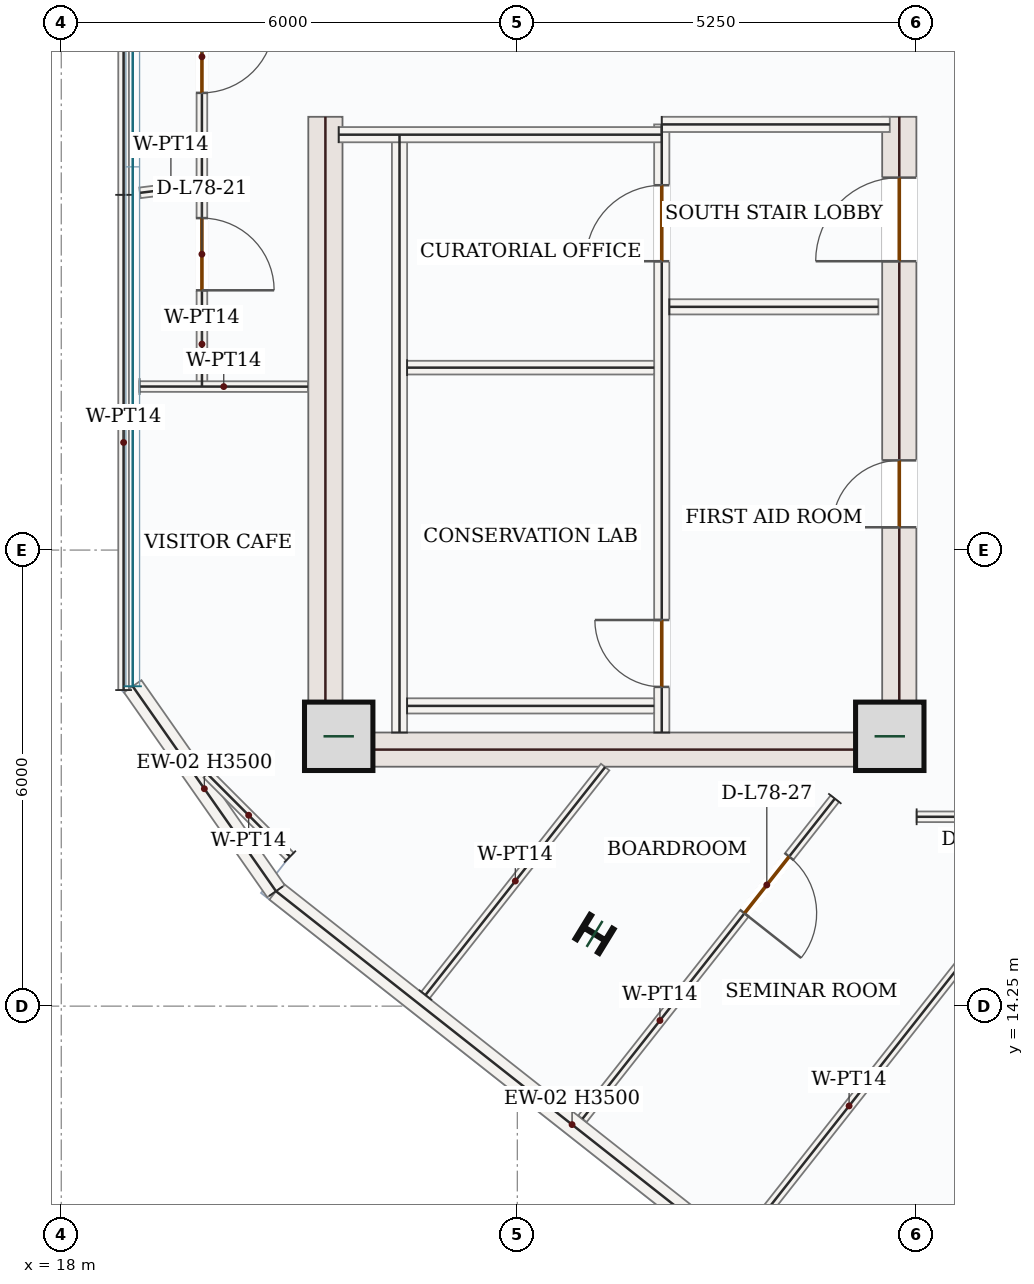
"""IFC4 building model, lengths in metres.
Left out: names, types, materials, properties, quantities, classifications, styles, units other than length and angle.
Written with IfcOpenShell. Run it as: python <this file> out.ifc"""

import sys

from ifc_helpers import new_model, si_unit, direction, frame, frame_2d, origin, origin_2d, place, context, subcontext, project, spatial, rectangle, i_section, extrude, source, transform, mapped, element, fill, save


model = new_model("IFC4")
c1 = context("Model", 3, precision=1e-05, world=origin(), true_north=direction((0.0, 1.0)))
c2 = subcontext(c1, "Body", "Model", "MODEL_VIEW")
j1 = project(units=[si_unit("LENGTHUNIT", "METRE"), si_unit("PLANEANGLEUNIT", "RADIAN")], contexts=[c1])
p1 = place(None, origin())
s1 = spatial("IfcSite", under=j1, at=p1, CompositionType="ELEMENT")
p2 = place(p1, origin())
s2 = spatial("IfcBuilding", under=s1, at=p2, CompositionType="ELEMENT")
p3 = place(p2, frame((0.0, 0.0, 323.55)))
s3 = spatial("IfcBuildingStorey", under=s2, at=p3, CompositionType="ELEMENT", Elevation=323.55)
m1 = source(origin(), c2, "Body", "SweptSolid", [
    extrude(rectangle(XDim=8.55, YDim=0.45, at=frame_2d((4.275, 0.0))), origin(), (0.0, 0.0, 1.0), 3.5),
])
p4 = place(p3, frame((21.475, 17.4, 0.0), z_axis=(0.0, 0.0, 1.0), x_axis=(0.0, 1.0, 0.0)))
e1 = element("IfcWall", 1, at=p4, inside=s3, PredefinedType="SHEAR", context=c2, shape_type="MappedRepresentation", body=[
    mapped(m1, transform((0.0, 0.0, 0.0), x_axis=(1.0, 0.0, 0.0), y_axis=(0.0, 1.0, 0.0), z_axis=(0.0, 0.0, 1.0), scale=1.0)),
])
p5 = place(p3, frame((29.025, 17.4, 0.0), z_axis=(0.0, 0.0, 1.0), x_axis=(0.0, 1.0, 0.0)))
e2 = element("IfcWall", 2, at=p5, inside=s3, PredefinedType="SHEAR", context=c2, shape_type="SweptSolid", body=[
    extrude(rectangle(XDim=8.55, YDim=0.45, at=frame_2d((4.275, 0.0))), origin(), (0.0, 0.0, 1.0), 3.5),
])
p6 = place(p5, frame((6.65, 0.0, 0.0)))
e3 = element("IfcOpeningElement", 3, at=p6, cuts=e2, PredefinedType="OPENING", context=c2, shape_type="SweptSolid", body=[
    extrude(rectangle(XDim=1.1, YDim=2.2, at=frame_2d((0.55, 1.1))), frame((0.0, 0.235, 0.0), z_axis=(0.0, -1.0, 0.0), x_axis=(1.0, 0.0, 0.0)), (0.0, 0.0, 1.0), 0.47),
])
p7 = place(p5, frame((3.15, 0.0, 0.0)))
e4 = element("IfcOpeningElement", 4, at=p7, cuts=e2, PredefinedType="OPENING", context=c2, shape_type="SweptSolid", body=[
    extrude(rectangle(XDim=0.88, YDim=2.1, at=frame_2d((0.44, 1.05))), frame((0.0, 0.235, 0.0), z_axis=(0.0, -1.0, 0.0), x_axis=(1.0, 0.0, 0.0)), (0.0, 0.0, 1.0), 0.47),
])
m2 = source(origin(), c2, "Body", "SweptSolid", [
    extrude(rectangle(XDim=7.1, YDim=0.45, at=frame_2d((3.55, 0.0))), origin(), (0.0, 0.0, 1.0), 3.5),
])
p8 = place(p3, frame((21.7, 17.625, 0.0), z_axis=(0.0, 0.0, 1.0), x_axis=(1.0, 0.0, 0.0)))
e5 = element("IfcWall", 5, at=p8, inside=s3, PredefinedType="SHEAR", context=c2, shape_type="MappedRepresentation", body=[
    mapped(m2, transform((0.0, 0.0, 0.0), x_axis=(1.0, 0.0, 0.0), y_axis=(0.0, 1.0, 0.0), z_axis=(0.0, 0.0, 1.0), scale=1.0)),
])
m3 = source(origin(), c2, "Body", "SweptSolid", [
    extrude(rectangle(XDim=0.9, YDim=0.9, at=origin_2d()), origin(), (0.0, 0.0, 1.0), 3.75),
])
for number, where, z_axis, x_axis in (
    (6, (21.65, 17.8, 0.0), (0.0, 0.0, 1.0), (1.0, 0.0, 0.0)),
    (7, (28.9, 17.8, 0.0), (0.0, 0.0, 1.0), (1.0, 0.0, 0.0)),
):
    element("IfcColumn", number, at=place(p3, frame(where, z_axis=z_axis, x_axis=x_axis)), inside=s3, PredefinedType="COLUMN", context=c2, shape_type="MappedRepresentation", body=[
        mapped(m3, transform((0.0, 0.0, 0.0), x_axis=(1.0, 0.0, 0.0), y_axis=(0.0, 1.0, 0.0), z_axis=(0.0, 0.0, 1.0), scale=1.0)),
    ])
m4 = source(origin(), c2, "Body", "SweptSolid", [
    extrude(i_section(OverallWidth=0.374, OverallDepth=0.372, WebThickness=0.016, FlangeThickness=0.026, FilletRadius=0.018, at=origin_2d()), origin(), (0.0, 0.0, 1.0), 3.75),
])
p9 = place(p3, frame((25.016, 15.2, 0.0), z_axis=(0.0, 0.0, 1.0), x_axis=(0.522498564716, 0.852640164354, 0.0)))
e8 = element("IfcColumn", 8, at=p9, inside=s3, PredefinedType="COLUMN", context=c2, shape_type="MappedRepresentation", body=[
    mapped(m4, transform((0.0, 0.0, 0.0), x_axis=(1.0, 0.0, 0.0), y_axis=(0.0, 1.0, 0.0), z_axis=(0.0, 0.0, 1.0), scale=1.0)),
])
m5 = source(origin(), c2, "Body", "SweptSolid", [
    extrude(rectangle(XDim=9.92, YDim=0.28, at=frame_2d((4.96, 0.0))), origin(), (0.0, 0.0, 1.0), 3.5),
])
p10 = place(p3, frame((28.615, 9.621, 0.0), z_axis=(0.0, 0.0, 1.0), x_axis=(-0.785317257435, 0.619093535077, 0.0)))
e9 = element("IfcWall", 9, at=p10, inside=s3, PredefinedType="SOLIDWALL", context=c2, shape_type="MappedRepresentation", body=[
    mapped(m5, transform((0.0, 0.0, 0.0), x_axis=(1.0, 0.0, 0.0), y_axis=(0.0, 1.0, 0.0), z_axis=(0.0, 0.0, 1.0), scale=1.0)),
])
m6 = source(origin(), c2, "Body", "SweptSolid", [
    extrude(rectangle(XDim=3.29, YDim=0.28, at=frame_2d((1.645, 0.0))), origin(), (0.0, 0.0, 1.0), 3.5),
])
p11 = place(p3, frame((20.825, 15.762, 0.0), z_axis=(0.0, 0.0, 1.0), x_axis=(-0.573043854491, 0.819524704222, 0.0)))
e10 = element("IfcWall", 10, at=p11, inside=s3, PredefinedType="SOLIDWALL", context=c2, shape_type="MappedRepresentation", body=[
    mapped(m6, transform((0.0, 0.0, 0.0), x_axis=(1.0, 0.0, 0.0), y_axis=(0.0, 1.0, 0.0), z_axis=(0.0, 0.0, 1.0), scale=1.0)),
])
m7 = source(origin(), c2, "Body", "SweptSolid", [
    extrude(rectangle(XDim=7.87, YDim=0.2, at=frame_2d((3.935, 0.0))), origin(), (0.0, 0.0, 1.0), 3.5),
])
p12 = place(p3, frame((22.45, 17.85, 0.0), z_axis=(0.0, 0.0, 1.0), x_axis=(0.0, 1.0, 0.0)))
e11 = element("IfcWall", 11, at=p12, inside=s3, PredefinedType="SOLIDWALL", context=c2, shape_type="MappedRepresentation", body=[
    mapped(m7, transform((0.0, 0.0, 0.0), x_axis=(1.0, 0.0, 0.0), y_axis=(0.0, 1.0, 0.0), z_axis=(0.0, 0.0, 1.0), scale=1.0)),
])
p13 = place(p3, frame((25.9, 17.85, 0.0), z_axis=(0.0, 0.0, 1.0), x_axis=(0.0, 1.0, 0.0)))
e12 = element("IfcWall", 12, at=p13, inside=s3, PredefinedType="SOLIDWALL", context=c2, shape_type="SweptSolid", body=[
    extrude(rectangle(XDim=8.0, YDim=0.2, at=frame_2d((4.0, 0.0))), origin(), (0.0, 0.0, 1.0), 3.5),
])
p14 = place(p13, frame((6.2, 0.0, 0.0)))
e13 = element("IfcOpeningElement", 13, at=p14, cuts=e12, PredefinedType="OPENING", context=c2, shape_type="SweptSolid", body=[
    extrude(rectangle(XDim=1.0, YDim=2.15, at=frame_2d((0.5, 1.075))), frame((0.0, 0.11, 0.0), z_axis=(0.0, -1.0, 0.0), x_axis=(1.0, 0.0, 0.0)), (0.0, 0.0, 1.0), 0.22),
])
p15 = place(p13, frame((0.6, 0.0, 0.0)))
e14 = element("IfcOpeningElement", 14, at=p15, cuts=e12, PredefinedType="OPENING", context=c2, shape_type="SweptSolid", body=[
    extrude(rectangle(XDim=0.88, YDim=2.1, at=frame_2d((0.44, 1.05))), frame((0.0, 0.11, 0.0), z_axis=(0.0, -1.0, 0.0), x_axis=(1.0, 0.0, 0.0)), (0.0, 0.0, 1.0), 0.22),
])
m8 = source(origin(), c2, "Body", "SweptSolid", [
    extrude(rectangle(XDim=4.25, YDim=0.2, at=frame_2d((2.125, 0.0))), origin(), (0.0, 0.0, 1.0), 3.5),
])
p16 = place(p3, frame((21.65, 25.715, 0.0), z_axis=(0.0, 0.0, 1.0), x_axis=(1.0, 0.0, 0.0)))
e15 = element("IfcWall", 15, at=p16, inside=s3, PredefinedType="SOLIDWALL", context=c2, shape_type="MappedRepresentation", body=[
    mapped(m8, transform((0.0, 0.0, 0.0), x_axis=(1.0, 0.0, 0.0), y_axis=(0.0, 1.0, 0.0), z_axis=(0.0, 0.0, 1.0), scale=1.0)),
])
m9 = source(origin(), c2, "Body", "SweptSolid", [
    extrude(rectangle(XDim=3.0, YDim=0.2, at=frame_2d((1.5, 0.0))), origin(), (0.0, 0.0, 1.0), 3.5),
])
p17 = place(p3, frame((25.9, 25.85, 0.0), z_axis=(0.0, 0.0, 1.0), x_axis=(1.0, 0.0, 0.0)))
e16 = element("IfcWall", 16, at=p17, inside=s3, PredefinedType="SOLIDWALL", context=c2, shape_type="MappedRepresentation", body=[
    mapped(m9, transform((0.0, 0.0, 0.0), x_axis=(1.0, 0.0, 0.0), y_axis=(0.0, 1.0, 0.0), z_axis=(0.0, 0.0, 1.0), scale=1.0)),
])
m10 = source(origin(), c2, "Body", "SweptSolid", [
    extrude(rectangle(XDim=3.25, YDim=0.2, at=frame_2d((1.625, 0.0))), origin(), (0.0, 0.0, 1.0), 3.5),
])
p18 = place(p3, frame((22.55, 18.2, 0.0), z_axis=(0.0, 0.0, 1.0), x_axis=(1.0, 0.0, 0.0)))
e17 = element("IfcWall", 17, at=p18, inside=s3, PredefinedType="SOLIDWALL", context=c2, shape_type="MappedRepresentation", body=[
    mapped(m10, transform((0.0, 0.0, 0.0), x_axis=(1.0, 0.0, 0.0), y_axis=(0.0, 1.0, 0.0), z_axis=(0.0, 0.0, 1.0), scale=1.0)),
])
m11 = source(origin(), c2, "Body", "SweptSolid", [
    extrude(rectangle(XDim=3.25, YDim=0.18, at=frame_2d((1.625, 0.0))), origin(), (0.0, 0.0, 1.0), 3.5),
])
p19 = place(p3, frame((22.55, 22.65, 0.0), z_axis=(0.0, 0.0, 1.0), x_axis=(1.0, 0.0, 0.0)))
e18 = element("IfcWall", 18, at=p19, inside=s3, PredefinedType="PARTITIONING", context=c2, shape_type="MappedRepresentation", body=[
    mapped(m11, transform((0.0, 0.0, 0.0), x_axis=(1.0, 0.0, 0.0), y_axis=(0.0, 1.0, 0.0), z_axis=(0.0, 0.0, 1.0), scale=1.0)),
])
m12 = source(origin(), c2, "Body", "SweptSolid", [
    extrude(rectangle(XDim=2.75, YDim=0.2, at=frame_2d((1.375, 0.0))), origin(), (0.0, 0.0, 1.0), 3.5),
])
p20 = place(p3, frame((26.0, 23.45, 0.0), z_axis=(0.0, 0.0, 1.0), x_axis=(1.0, 0.0, 0.0)))
e19 = element("IfcWall", 19, at=p20, inside=s3, PredefinedType="SOLIDWALL", context=c2, shape_type="MappedRepresentation", body=[
    mapped(m12, transform((0.0, 0.0, 0.0), x_axis=(1.0, 0.0, 0.0), y_axis=(0.0, 1.0, 0.0), z_axis=(0.0, 0.0, 1.0), scale=1.0)),
])
m13 = source(origin(), c2, "Body", "SweptSolid", [
    extrude(rectangle(XDim=3.818, YDim=0.14, at=frame_2d((1.909, 0.0))), origin(), (0.0, 0.0, 1.0), 3.5),
])
p21 = place(p3, frame((22.792, 14.396, 0.0), z_axis=(0.0, 0.0, 1.0), x_axis=(0.619119655452, 0.78529666511, 0.0)))
e20 = element("IfcWall", 20, at=p21, inside=s3, PredefinedType="PARTITIONING", context=c2, shape_type="MappedRepresentation", body=[
    mapped(m13, transform((0.0, 0.0, 0.0), x_axis=(1.0, 0.0, 0.0), y_axis=(0.0, 1.0, 0.0), z_axis=(0.0, 0.0, 1.0), scale=1.0)),
])
p22 = place(p3, frame((28.177, 16.98, 0.0), z_axis=(0.0, 0.0, 1.0), x_axis=(-0.619105408422, -0.785307897109, 0.0)))
e21 = element("IfcWall", 21, at=p22, inside=s3, PredefinedType="PARTITIONING", context=c2, shape_type="SweptSolid", body=[
    extrude(rectangle(XDim=5.363, YDim=0.14, at=frame_2d((2.682, 0.0))), origin(), (0.0, 0.0, 1.0), 3.5),
])
p23 = place(p22, frame((0.971, 0.0, 0.0)))
e22 = element("IfcOpeningElement", 22, at=p23, cuts=e21, PredefinedType="OPENING", context=c2, shape_type="SweptSolid", body=[
    extrude(rectangle(XDim=0.95, YDim=2.15, at=frame_2d((0.475, 1.075))), frame((0.0, 0.08, 0.0), z_axis=(0.0, -1.0, 0.0), x_axis=(1.0, 0.0, 0.0)), (0.0, 0.0, 1.0), 0.16),
])
m14 = source(origin(), c2, "Body", "SweptSolid", [
    extrude(rectangle(XDim=2.109, YDim=0.14, at=frame_2d((1.054, 0.0))), origin(), (0.0, 0.0, 1.0), 3.5),
])
p24 = place(p3, frame((29.253, 16.741, 0.0), z_axis=(0.0, 0.0, 1.0), x_axis=(0.999999832474, -0.000578837597, 0.0)))
e23 = element("IfcWall", 23, at=p24, inside=s3, PredefinedType="PARTITIONING", context=c2, shape_type="MappedRepresentation", body=[
    mapped(m14, transform((0.0, 0.0, 0.0), x_axis=(1.0, 0.0, 0.0), y_axis=(0.0, 1.0, 0.0), z_axis=(0.0, 0.0, 1.0), scale=1.0)),
])
p25 = place(p3, frame((31.303, 16.665, 0.0), z_axis=(0.0, 0.0, 1.0), x_axis=(-0.619105259882, -0.785308014213, 0.0)))
e24 = element("IfcWall", 24, at=p25, inside=s3, PredefinedType="PARTITIONING", context=c2, shape_type="SweptSolid", body=[
    extrude(rectangle(XDim=7.051, YDim=0.14, at=frame_2d((3.525, 0.0))), origin(), (0.0, 0.0, 1.0), 3.5),
])
p26 = place(p25, frame((1.342, 0.0, 0.0)))
e25 = element("IfcOpeningElement", 25, at=p26, cuts=e24, PredefinedType="OPENING", context=c2, shape_type="SweptSolid", body=[
    extrude(rectangle(XDim=0.95, YDim=2.15, at=frame_2d((0.475, 1.075))), frame((0.0, 0.08, 0.0), z_axis=(0.0, -1.0, 0.0), x_axis=(1.0, 0.0, 0.0)), (0.0, 0.0, 1.0), 0.16),
])
p27 = place(p3, frame((19.853, 31.523, 0.0), z_axis=(0.0, 0.0, 1.0), x_axis=(-0.000377187662, -0.999999928865, 0.0)))
e26 = element("IfcWall", 26, at=p27, inside=s3, PredefinedType="PARTITIONING", context=c2, shape_type="SweptSolid", body=[
    extrude(rectangle(XDim=6.473, YDim=0.14, at=frame_2d((3.236, 0.0))), origin(), (0.0, 0.0, 1.0), 3.5),
])
p28 = place(p27, frame((4.308, 0.0, 0.0)))
e27 = element("IfcOpeningElement", 27, at=p28, cuts=e26, PredefinedType="OPENING", context=c2, shape_type="SweptSolid", body=[
    extrude(rectangle(XDim=0.95, YDim=2.15, at=frame_2d((0.475, 1.075))), frame((0.0, 0.08, 0.0), z_axis=(0.0, -1.0, 0.0), x_axis=(1.0, 0.0, 0.0)), (0.0, 0.0, 1.0), 0.16),
])
m15 = source(origin(), c2, "Body", "SweptSolid", [
    extrude(rectangle(XDim=0.821, YDim=0.14, at=frame_2d((0.41, 0.0))), origin(), (0.0, 0.0, 1.0), 3.5),
])
p29 = place(p3, frame((19.85, 25.05, 0.0), z_axis=(0.0, 0.0, 1.0), x_axis=(-0.992500466698, -0.122240842617, 0.0)))
e28 = element("IfcWall", 28, at=p29, inside=s3, PredefinedType="PARTITIONING", context=c2, shape_type="MappedRepresentation", body=[
    mapped(m15, transform((0.0, 0.0, 0.0), x_axis=(1.0, 0.0, 0.0), y_axis=(0.0, 1.0, 0.0), z_axis=(0.0, 0.0, 1.0), scale=1.0)),
])
m16 = source(origin(), c2, "Body", "SweptSolid", [
    extrude(rectangle(XDim=6.968, YDim=0.14, at=frame_2d((3.484, 0.0))), origin(), (0.0, 0.0, 1.0), 3.5),
])
p30 = place(p3, frame((18.82, 24.923, 0.0), z_axis=(0.0, 0.0, 1.0), x_axis=(0.0, 1.0, 0.0)))
e29 = element("IfcWall", 29, at=p30, inside=s3, PredefinedType="PARTITIONING", context=c2, shape_type="MappedRepresentation", body=[
    mapped(m16, transform((0.0, 0.0, 0.0), x_axis=(1.0, 0.0, 0.0), y_axis=(0.0, 1.0, 0.0), z_axis=(0.0, 0.0, 1.0), scale=1.0)),
])
p31 = place(p3, frame((19.85, 24.975, 0.0), z_axis=(0.0, 0.0, 1.0), x_axis=(0.000379434615, -0.999999928015, 0.0)))
e30 = element("IfcWall", 30, at=p31, inside=s3, PredefinedType="PARTITIONING", context=c2, shape_type="SweptSolid", body=[
    extrude(rectangle(XDim=2.574, YDim=0.14, at=frame_2d((1.287, 0.0))), origin(), (0.0, 0.0, 1.0), 3.5),
])
p32 = place(p31, frame((0.357, 0.0, 0.0)))
e31 = element("IfcOpeningElement", 31, at=p32, cuts=e30, PredefinedType="OPENING", context=c2, shape_type="SweptSolid", body=[
    extrude(rectangle(XDim=0.95, YDim=2.15, at=frame_2d((0.475, 1.075))), frame((0.0, 0.08, 0.0), z_axis=(0.0, -1.0, 0.0), x_axis=(1.0, 0.0, 0.0)), (0.0, 0.0, 1.0), 0.16),
])
m17 = source(origin(), c2, "Body", "SweptSolid", [
    extrude(rectangle(XDim=2.215, YDim=0.14, at=frame_2d((1.107, 0.0))), origin(), (0.0, 0.0, 1.0), 3.5),
])
p33 = place(p3, frame((19.03, 22.402, 0.0), z_axis=(0.0, 0.0, 1.0), x_axis=(0.999999702379, -0.000771519665, 0.0)))
e32 = element("IfcWall", 32, at=p33, inside=s3, PredefinedType="PARTITIONING", context=c2, shape_type="MappedRepresentation", body=[
    mapped(m17, transform((0.0, 0.0, 0.0), x_axis=(1.0, 0.0, 0.0), y_axis=(0.0, 1.0, 0.0), z_axis=(0.0, 0.0, 1.0), scale=1.0)),
])
m18 = source(origin(), c2, "Body", "SweptSolid", [
    extrude(rectangle(XDim=1.538, YDim=0.14, at=frame_2d((0.769, 0.0))), origin(), (0.0, 0.0, 1.0), 3.5),
])
p34 = place(p3, frame((21.009, 16.217, 0.0), z_axis=(0.0, 0.0, 1.0), x_axis=(-0.706709909315, 0.707503430434, 0.0)))
e33 = element("IfcWall", 33, at=p34, inside=s3, PredefinedType="PARTITIONING", context=c2, shape_type="MappedRepresentation", body=[
    mapped(m18, transform((0.0, 0.0, 0.0), x_axis=(1.0, 0.0, 0.0), y_axis=(0.0, 1.0, 0.0), z_axis=(0.0, 0.0, 1.0), scale=1.0)),
])
m19 = source(origin(), c2, "Body", "SweptSolid", [
    extrude(rectangle(XDim=6.515, YDim=0.14, at=frame_2d((3.258, 0.0))), origin(), (0.0, 0.0, 1.0), 3.5),
])
p35 = place(p3, frame((18.82, 18.408, 0.0), z_axis=(0.0, 0.0, 1.0), x_axis=(0.0, 1.0, 0.0)))
e34 = element("IfcWall", 34, at=p35, inside=s3, PredefinedType="PARTITIONING", context=c2, shape_type="MappedRepresentation", body=[
    mapped(m19, transform((0.0, 0.0, 0.0), x_axis=(1.0, 0.0, 0.0), y_axis=(0.0, 1.0, 0.0), z_axis=(0.0, 0.0, 1.0), scale=1.0)),
])
m20 = source(origin(), c2, "Body", "SweptSolid", [
    extrude(rectangle(XDim=1.0, YDim=2.15, at=frame_2d((0.5, 1.075))), frame((0.0, 0.025, 0.0), z_axis=(0.0, -1.0, 0.0), x_axis=(1.0, 0.0, 0.0)), (0.0, 0.0, 1.0), 0.05),
])
p36 = place(p14, origin())
e35 = element("IfcDoor", 35, at=p36, inside=s3, OperationType="SINGLE_SWING_LEFT", PredefinedType="DOOR", context=c2, shape_type="MappedRepresentation", body=[
    mapped(m20, transform((0.0, 0.0, 0.0), x_axis=(1.0, 0.0, 0.0), y_axis=(0.0, 1.0, 0.0), z_axis=(0.0, 0.0, 1.0), scale=1.0)),
])
fill(e13, e35)
m21 = source(origin(), c2, "Body", "SweptSolid", [
    extrude(rectangle(XDim=0.88, YDim=2.1, at=frame_2d((0.44, 1.05))), frame((0.0, 0.025, 0.0), z_axis=(0.0, -1.0, 0.0), x_axis=(1.0, 0.0, 0.0)), (0.0, 0.0, 1.0), 0.05),
])
p37 = place(p15, origin())
e36 = element("IfcDoor", 36, at=p37, inside=s3, OperationType="SINGLE_SWING_RIGHT", PredefinedType="DOOR", context=c2, shape_type="MappedRepresentation", body=[
    mapped(m21, transform((0.0, 0.0, 0.0), x_axis=(1.0, 0.0, 0.0), y_axis=(0.0, 1.0, 0.0), z_axis=(0.0, 0.0, 1.0), scale=1.0)),
])
fill(e14, e36)
m22 = source(origin(), c2, "Body", "SweptSolid", [
    extrude(rectangle(XDim=1.1, YDim=2.2, at=frame_2d((0.55, 1.1))), frame((0.0, 0.025, 0.0), z_axis=(0.0, -1.0, 0.0), x_axis=(1.0, 0.0, 0.0)), (0.0, 0.0, 1.0), 0.05),
])
p38 = place(p6, origin())
e37 = element("IfcDoor", 37, at=p38, inside=s3, OperationType="SINGLE_SWING_LEFT", PredefinedType="DOOR", context=c2, shape_type="MappedRepresentation", body=[
    mapped(m22, transform((0.0, 0.0, 0.0), x_axis=(1.0, 0.0, 0.0), y_axis=(0.0, 1.0, 0.0), z_axis=(0.0, 0.0, 1.0), scale=1.0)),
])
fill(e3, e37)
p39 = place(p7, origin())
e38 = element("IfcDoor", 38, at=p39, inside=s3, OperationType="SINGLE_SWING_LEFT", PredefinedType="DOOR", context=c2, shape_type="MappedRepresentation", body=[
    mapped(m21, transform((0.0, 0.0, 0.0), x_axis=(1.0, 0.0, 0.0), y_axis=(0.0, 1.0, 0.0), z_axis=(0.0, 0.0, 1.0), scale=1.0)),
])
fill(e4, e38)
m23 = source(origin(), c2, "Body", "SweptSolid", [
    extrude(rectangle(XDim=0.95, YDim=2.15, at=frame_2d((0.475, 1.075))), frame((0.0, 0.025, 0.0), z_axis=(0.0, -1.0, 0.0), x_axis=(1.0, 0.0, 0.0)), (0.0, 0.0, 1.0), 0.05),
])
p40 = place(p28, origin())
e39 = element("IfcDoor", 39, at=p40, inside=s3, OperationType="SINGLE_SWING_LEFT", PredefinedType="DOOR", context=c2, shape_type="MappedRepresentation", body=[
    mapped(m23, transform((0.0, 0.0, 0.0), x_axis=(1.0, 0.0, 0.0), y_axis=(0.0, 1.0, 0.0), z_axis=(0.0, 0.0, 1.0), scale=1.0)),
])
fill(e27, e39)
p41 = place(p32, origin())
e40 = element("IfcDoor", 40, at=p41, inside=s3, OperationType="SINGLE_SWING_RIGHT", PredefinedType="DOOR", context=c2, shape_type="MappedRepresentation", body=[
    mapped(m23, transform((0.0, 0.0, 0.0), x_axis=(1.0, 0.0, 0.0), y_axis=(0.0, 1.0, 0.0), z_axis=(0.0, 0.0, 1.0), scale=1.0)),
])
fill(e31, e40)
p42 = place(p23, origin())
e41 = element("IfcDoor", 41, at=p42, inside=s3, OperationType="SINGLE_SWING_RIGHT", PredefinedType="DOOR", context=c2, shape_type="MappedRepresentation", body=[
    mapped(m23, transform((0.0, 0.0, 0.0), x_axis=(1.0, 0.0, 0.0), y_axis=(0.0, 1.0, 0.0), z_axis=(0.0, 0.0, 1.0), scale=1.0)),
])
fill(e22, e41)
save(model, sys.argv[1])
